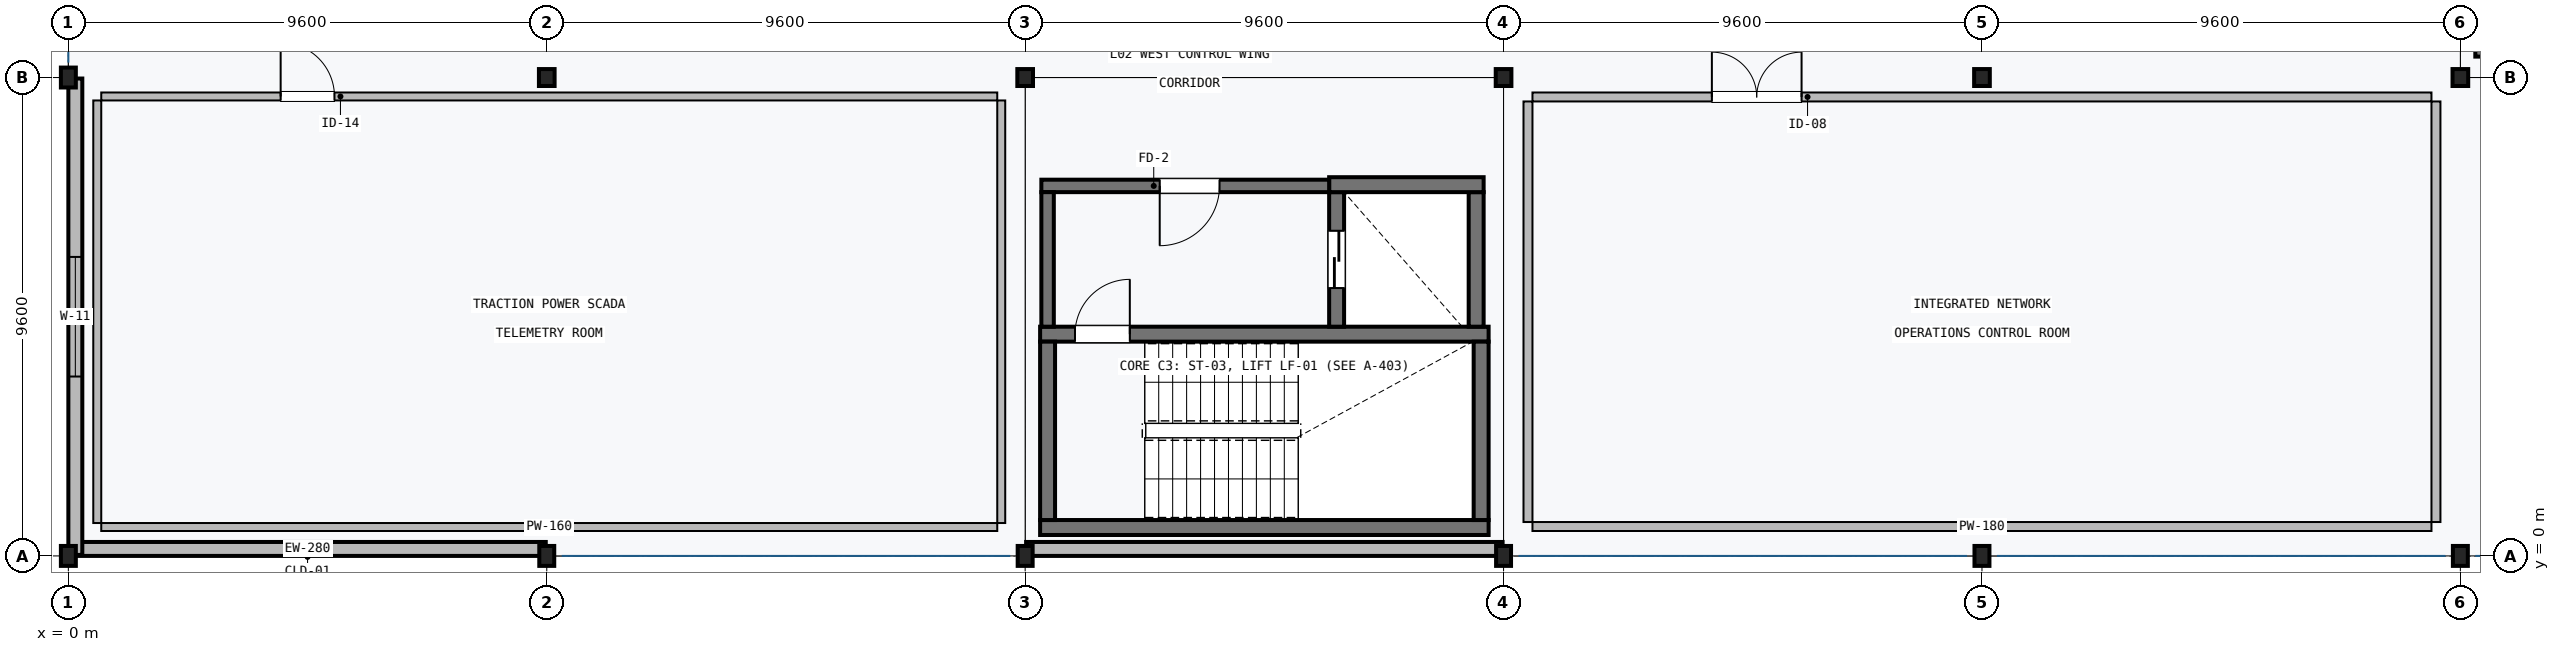
"""IFC4 building model, lengths in metres.
Left out: names, types, materials, properties, quantities, classifications, styles, units other than length and angle.
Written with IfcOpenShell. Run it as: python <this file> out.ifc"""

import sys

from ifc_helpers import new_model, si_unit, direction, frame, frame_2d, origin, origin_2d, place, context, subcontext, project, spatial, rectangle, i_section, extrude, element, fill, save


model = new_model("IFC4")
c1 = context("Model", 3, precision=1e-05, world=origin(), true_north=direction((0.0, 1.0)))
c2 = subcontext(c1, "Body", "Model", "MODEL_VIEW")
j1 = project(units=[si_unit("LENGTHUNIT", "METRE"), si_unit("PLANEANGLEUNIT", "RADIAN")], contexts=[c1])
p1 = place(None, origin())
s1 = spatial("IfcSite", under=j1, at=p1, CompositionType="ELEMENT")
p2 = place(p1, origin())
s2 = spatial("IfcBuilding", under=s1, at=p2, CompositionType="ELEMENT")
p3 = place(p2, frame((0.0, 0.0, 10.5)))
s3 = spatial("IfcBuildingStorey", under=s2, at=p3, CompositionType="ELEMENT", Elevation=10.5)
for number, where, z_axis, x_axis in (
    (1, (0.0, 0.0, 0.0), (0.0, 0.0, 1.0), (1.0, 0.0, 0.0)),
    (2, (0.0, 9.6, 0.0), (0.0, 0.0, 1.0), (1.0, 0.0, 0.0)),
    (3, (9.6, 0.0, 0.0), (0.0, 0.0, 1.0), (1.0, 0.0, 0.0)),
):
    element("IfcColumn", number, at=place(p3, frame(where, z_axis=z_axis, x_axis=x_axis)), inside=s3, PredefinedType="COLUMN", context=c2, shape_type="SweptSolid", body=[
        extrude(i_section(OverallWidth=0.3, OverallDepth=0.4, WebThickness=0.013, FlangeThickness=0.024, FilletRadius=0.027, at=origin_2d()), origin(), (0.0, 0.0, 1.0), 3.95),
    ])
p4 = place(p3, frame((9.6, 9.6, 0.0), z_axis=(0.0, 0.0, 1.0), x_axis=(1.0, 0.0, 0.0)))
e4 = element("IfcColumn", 4, at=p4, inside=s3, PredefinedType="COLUMN", context=c2, shape_type="SweptSolid", body=[
    extrude(i_section(OverallWidth=0.314, OverallDepth=0.34, WebThickness=0.019, FlangeThickness=0.031, FilletRadius=0.015, at=origin_2d()), origin(), (0.0, 0.0, 1.0), 3.95),
])
p5 = place(p3, frame((19.2, 0.0, 0.0), z_axis=(0.0, 0.0, 1.0), x_axis=(1.0, 0.0, 0.0)))
e5 = element("IfcColumn", 5, at=p5, inside=s3, PredefinedType="COLUMN", context=c2, shape_type="SweptSolid", body=[
    extrude(i_section(OverallWidth=0.3, OverallDepth=0.4, WebThickness=0.013, FlangeThickness=0.024, FilletRadius=0.027, at=origin_2d()), origin(), (0.0, 0.0, 1.0), 3.95),
])
p6 = place(p3, frame((19.2, 9.6, 0.0), z_axis=(0.0, 0.0, 1.0), x_axis=(1.0, 0.0, 0.0)))
e6 = element("IfcColumn", 6, at=p6, inside=s3, PredefinedType="COLUMN", context=c2, shape_type="SweptSolid", body=[
    extrude(i_section(OverallWidth=0.314, OverallDepth=0.34, WebThickness=0.019, FlangeThickness=0.031, FilletRadius=0.015, at=origin_2d()), origin(), (0.0, 0.0, 1.0), 3.95),
])
p7 = place(p3, frame((28.8, 0.0, 0.0), z_axis=(0.0, 0.0, 1.0), x_axis=(1.0, 0.0, 0.0)))
e7 = element("IfcColumn", 7, at=p7, inside=s3, PredefinedType="COLUMN", context=c2, shape_type="SweptSolid", body=[
    extrude(i_section(OverallWidth=0.3, OverallDepth=0.4, WebThickness=0.013, FlangeThickness=0.024, FilletRadius=0.027, at=origin_2d()), origin(), (0.0, 0.0, 1.0), 3.95),
])
p8 = place(p3, frame((28.8, 9.6, 0.0), z_axis=(0.0, 0.0, 1.0), x_axis=(1.0, 0.0, 0.0)))
e8 = element("IfcColumn", 8, at=p8, inside=s3, PredefinedType="COLUMN", context=c2, shape_type="SweptSolid", body=[
    extrude(i_section(OverallWidth=0.314, OverallDepth=0.34, WebThickness=0.019, FlangeThickness=0.031, FilletRadius=0.015, at=origin_2d()), origin(), (0.0, 0.0, 1.0), 3.95),
])
p9 = place(p3, frame((38.4, 0.0, 0.0), z_axis=(0.0, 0.0, 1.0), x_axis=(1.0, 0.0, 0.0)))
e9 = element("IfcColumn", 9, at=p9, inside=s3, PredefinedType="COLUMN", context=c2, shape_type="SweptSolid", body=[
    extrude(i_section(OverallWidth=0.3, OverallDepth=0.4, WebThickness=0.013, FlangeThickness=0.024, FilletRadius=0.027, at=origin_2d()), origin(), (0.0, 0.0, 1.0), 3.95),
])
p10 = place(p3, frame((38.4, 9.6, 0.0), z_axis=(0.0, 0.0, 1.0), x_axis=(1.0, 0.0, 0.0)))
e10 = element("IfcColumn", 10, at=p10, inside=s3, PredefinedType="COLUMN", context=c2, shape_type="SweptSolid", body=[
    extrude(i_section(OverallWidth=0.314, OverallDepth=0.34, WebThickness=0.019, FlangeThickness=0.031, FilletRadius=0.015, at=origin_2d()), origin(), (0.0, 0.0, 1.0), 3.95),
])
p11 = place(p3, frame((48.0, 0.0, 0.0), z_axis=(0.0, 0.0, 1.0), x_axis=(1.0, 0.0, 0.0)))
e11 = element("IfcColumn", 11, at=p11, inside=s3, PredefinedType="COLUMN", context=c2, shape_type="SweptSolid", body=[
    extrude(i_section(OverallWidth=0.3, OverallDepth=0.4, WebThickness=0.013, FlangeThickness=0.024, FilletRadius=0.027, at=origin_2d()), origin(), (0.0, 0.0, 1.0), 3.95),
])
p12 = place(p3, frame((48.0, 9.6, 0.0), z_axis=(0.0, 0.0, 1.0), x_axis=(1.0, 0.0, 0.0)))
e12 = element("IfcColumn", 12, at=p12, inside=s3, PredefinedType="COLUMN", context=c2, shape_type="SweptSolid", body=[
    extrude(i_section(OverallWidth=0.314, OverallDepth=0.34, WebThickness=0.019, FlangeThickness=0.031, FilletRadius=0.015, at=origin_2d()), origin(), (0.0, 0.0, 1.0), 3.95),
])
for number, where, z_axis, x_axis in (
    (13, (48.3, 10.17, 0.0), (0.0, 0.0, 1.0), (1.0, 0.0, 0.0)),
    (14, (19.5, 0.57, 0.0), (0.0, 0.0, 1.0), (1.0, 0.0, 0.0)),
):
    element("IfcWall", number, at=place(p3, frame(where, z_axis=z_axis, x_axis=x_axis)), inside=s3, PredefinedType="SHEAR", context=c2, shape_type="SweptSolid", body=[
        extrude(rectangle(XDim=9.0, YDim=0.3, at=frame_2d((4.5, 0.0))), origin(), (0.0, 0.0, 1.0), 3.95),
    ])
p13 = place(p3, frame((28.5, 4.45, 0.0), z_axis=(0.0, 0.0, 1.0), x_axis=(-1.0, 0.0, 0.0)))
e15 = element("IfcWall", 15, at=p13, inside=s3, PredefinedType="SHEAR", context=c2, shape_type="SweptSolid", body=[
    extrude(rectangle(XDim=9.0, YDim=0.3, at=frame_2d((4.5, 0.0))), origin(), (0.0, 0.0, 1.0), 3.95),
])
p14 = place(p13, frame((7.2, 0.0, 0.0)))
e16 = element("IfcOpeningElement", 16, at=p14, cuts=e15, PredefinedType="OPENING", context=c2, shape_type="SweptSolid", body=[
    extrude(rectangle(XDim=1.1, YDim=2.15, at=frame_2d((0.55, 1.075))), frame((0.0, 0.16, 0.0), z_axis=(0.0, -1.0, 0.0), x_axis=(1.0, 0.0, 0.0)), (0.0, 0.0, 1.0), 0.32),
])
for number, where, z_axis, x_axis in (
    (17, (19.65, 0.72, 0.0), (0.0, 0.0, 1.0), (0.0, 1.0, 0.0)),
    (18, (28.35, 4.3, 0.0), (0.0, 0.0, 1.0), (0.0, -1.0, 0.0)),
):
    element("IfcWall", number, at=place(p3, frame(where, z_axis=z_axis, x_axis=x_axis)), inside=s3, PredefinedType="SHEAR", context=c2, shape_type="SweptSolid", body=[
        extrude(rectangle(XDim=3.58, YDim=0.3, at=frame_2d((1.79, 0.0))), origin(), (0.0, 0.0, 1.0), 3.95),
    ])
p15 = place(p3, frame((25.45, 7.3, 0.0), z_axis=(0.0, 0.0, 1.0), x_axis=(0.0, -1.0, 0.0)))
e19 = element("IfcWall", 19, at=p15, inside=s3, PredefinedType="SHEAR", context=c2, shape_type="SweptSolid", body=[
    extrude(rectangle(XDim=2.7, YDim=0.3, at=frame_2d((1.35, 0.0))), origin(), (0.0, 0.0, 1.0), 3.95),
])
p16 = place(p15, frame((0.775, 0.0, 0.0)))
e20 = element("IfcOpeningElement", 20, at=p16, cuts=e19, PredefinedType="OPENING", context=c2, shape_type="SweptSolid", body=[
    extrude(rectangle(XDim=1.15, YDim=2.1, at=frame_2d((0.575, 1.05))), frame((0.0, 0.16, 0.0), z_axis=(0.0, -1.0, 0.0), x_axis=(1.0, 0.0, 0.0)), (0.0, 0.0, 1.0), 0.32),
])
p17 = place(p3, frame((28.25, 4.6, 0.0), z_axis=(0.0, 0.0, 1.0), x_axis=(0.0, 1.0, 0.0)))
e21 = element("IfcWall", 21, at=p17, inside=s3, PredefinedType="SHEAR", context=c2, shape_type="SweptSolid", body=[
    extrude(rectangle(XDim=2.7, YDim=0.3, at=frame_2d((1.35, 0.0))), origin(), (0.0, 0.0, 1.0), 3.95),
])
p18 = place(p3, frame((25.3, 7.45, 0.0), z_axis=(0.0, 0.0, 1.0), x_axis=(1.0, 0.0, 0.0)))
e22 = element("IfcWall", 22, at=p18, inside=s3, PredefinedType="SHEAR", context=c2, shape_type="SweptSolid", body=[
    extrude(rectangle(XDim=3.1, YDim=0.3, at=frame_2d((1.55, 0.0))), origin(), (0.0, 0.0, 1.0), 3.95),
])
p19 = place(p3, frame((25.3, 7.425, 0.0), z_axis=(0.0, 0.0, 1.0), x_axis=(-1.0, 0.0, 0.0)))
e23 = element("IfcWall", 23, at=p19, inside=s3, PredefinedType="SHEAR", context=c2, shape_type="SweptSolid", body=[
    extrude(rectangle(XDim=5.775, YDim=0.25, at=frame_2d((2.888, 0.0))), origin(), (0.0, 0.0, 1.0), 3.95),
])
p20 = place(p19, frame((2.2, 0.0, 0.0)))
e24 = element("IfcOpeningElement", 24, at=p20, cuts=e23, PredefinedType="OPENING", context=c2, shape_type="SweptSolid", body=[
    extrude(rectangle(XDim=1.2, YDim=2.15, at=frame_2d((0.6, 1.075))), frame((0.0, 0.135, 0.0), z_axis=(0.0, -1.0, 0.0), x_axis=(1.0, 0.0, 0.0)), (0.0, 0.0, 1.0), 0.27),
])
p21 = place(p3, frame((19.65, 4.6, 0.0), z_axis=(0.0, 0.0, 1.0), x_axis=(0.0, 1.0, 0.0)))
e25 = element("IfcWall", 25, at=p21, inside=s3, PredefinedType="SHEAR", context=c2, shape_type="SweptSolid", body=[
    extrude(rectangle(XDim=2.7, YDim=0.25, at=frame_2d((1.35, 0.0))), origin(), (0.0, 0.0, 1.0), 3.95),
])
p22 = place(p3, frame((9.58, 0.14, 0.0), z_axis=(0.0, 0.0, 1.0), x_axis=(-1.0, 0.0, 0.0)))
e26 = element("IfcWall", 26, at=p22, inside=s3, PredefinedType="SOLIDWALL", context=c2, shape_type="SweptSolid", body=[
    extrude(rectangle(XDim=9.56, YDim=0.28, at=frame_2d((4.78, 0.0))), origin(), (0.0, 0.0, 1.0), 3.66),
])
p23 = place(p3, frame((0.14, 0.02, 0.0), z_axis=(0.0, 0.0, 1.0), x_axis=(0.0, 1.0, 0.0)))
e27 = element("IfcWall", 27, at=p23, inside=s3, PredefinedType="SOLIDWALL", context=c2, shape_type="SweptSolid", body=[
    extrude(rectangle(XDim=9.56, YDim=0.28, at=frame_2d((4.78, 0.0))), origin(), (0.0, 0.0, 1.0), 3.493),
])
p24 = place(p23, frame((3.58, 0.0, 1.3)))
e28 = element("IfcOpeningElement", 28, at=p24, cuts=e27, PredefinedType="OPENING", context=c2, shape_type="SweptSolid", body=[
    extrude(rectangle(XDim=2.4, YDim=1.05, at=frame_2d((1.2, 0.525))), frame((0.0, 0.15, 0.0), z_axis=(0.0, -1.0, 0.0), x_axis=(1.0, 0.0, 0.0)), (0.0, 0.0, 1.0), 0.3),
])
p25 = place(p3, frame((28.78, 0.14, 0.0), z_axis=(0.0, 0.0, 1.0), x_axis=(-1.0, 0.0, 0.0)))
e29 = element("IfcWall", 29, at=p25, inside=s3, PredefinedType="SOLIDWALL", context=c2, shape_type="SweptSolid", body=[
    extrude(rectangle(XDim=9.56, YDim=0.28, at=frame_2d((4.78, 0.0))), origin(), (0.0, 0.0, 1.0), 3.66),
])
p26 = place(p3, frame((47.42, 0.59, 0.0), z_axis=(0.0, 0.0, 1.0), x_axis=(-1.0, 0.0, 0.0)))
e30 = element("IfcWall", 30, at=p26, inside=s3, PredefinedType="PARTITIONING", context=c2, shape_type="SweptSolid", body=[
    extrude(rectangle(XDim=18.04, YDim=0.18, at=frame_2d((9.02, 0.0))), origin(), (0.0, 0.0, 1.0), 3.483),
])
p27 = place(p3, frame((29.38, 9.21, 0.0), z_axis=(0.0, 0.0, 1.0), x_axis=(1.0, 0.0, 0.0)))
e31 = element("IfcWall", 31, at=p27, inside=s3, PredefinedType="PARTITIONING", context=c2, shape_type="SweptSolid", body=[
    extrude(rectangle(XDim=18.04, YDim=0.18, at=frame_2d((9.02, 0.0))), origin(), (0.0, 0.0, 1.0), 3.483),
])
p28 = place(p27, frame((3.6, 0.0, 0.0)))
e32 = element("IfcOpeningElement", 32, at=p28, cuts=e31, PredefinedType="OPENING", context=c2, shape_type="SweptSolid", body=[
    extrude(rectangle(XDim=1.8, YDim=2.35, at=frame_2d((0.9, 1.175))), frame((0.0, 0.1, 0.0), z_axis=(0.0, -1.0, 0.0), x_axis=(1.0, 0.0, 0.0)), (0.0, 0.0, 1.0), 0.2),
])
for number, where, z_axis, x_axis in (
    (33, (29.29, 0.68, 0.0), (0.0, 0.0, 1.0), (0.0, 1.0, 0.0)),
    (34, (47.51, 9.12, 0.0), (0.0, 0.0, 1.0), (0.0, -1.0, 0.0)),
):
    element("IfcWall", number, at=place(p3, frame(where, z_axis=z_axis, x_axis=x_axis)), inside=s3, PredefinedType="PARTITIONING", context=c2, shape_type="SweptSolid", body=[
        extrude(rectangle(XDim=8.44, YDim=0.18, at=frame_2d((4.22, 0.0))), origin(), (0.0, 0.0, 1.0), 3.59),
    ])
p29 = place(p3, frame((18.64, 0.58, 0.0), z_axis=(0.0, 0.0, 1.0), x_axis=(-1.0, 0.0, 0.0)))
e35 = element("IfcWall", 35, at=p29, inside=s3, PredefinedType="PARTITIONING", context=c2, shape_type="SweptSolid", body=[
    extrude(rectangle(XDim=17.98, YDim=0.16, at=frame_2d((8.99, 0.0))), origin(), (0.0, 0.0, 1.0), 3.483),
])
p30 = place(p3, frame((0.66, 9.22, 0.0), z_axis=(0.0, 0.0, 1.0), x_axis=(1.0, 0.0, 0.0)))
e36 = element("IfcWall", 36, at=p30, inside=s3, PredefinedType="PARTITIONING", context=c2, shape_type="SweptSolid", body=[
    extrude(rectangle(XDim=17.98, YDim=0.16, at=frame_2d((8.99, 0.0))), origin(), (0.0, 0.0, 1.0), 3.483),
])
p31 = place(p30, frame((3.6, 0.0, 0.0)))
e37 = element("IfcOpeningElement", 37, at=p31, cuts=e36, PredefinedType="OPENING", context=c2, shape_type="SweptSolid", body=[
    extrude(rectangle(XDim=1.08, YDim=2.2, at=frame_2d((0.54, 1.1))), frame((0.0, 0.09, 0.0), z_axis=(0.0, -1.0, 0.0), x_axis=(1.0, 0.0, 0.0)), (0.0, 0.0, 1.0), 0.18),
])
for number, where, z_axis, x_axis in (
    (38, (0.58, 0.66, 0.0), (0.0, 0.0, 1.0), (0.0, 1.0, 0.0)),
    (39, (18.72, 9.14, 0.0), (0.0, 0.0, 1.0), (0.0, -1.0, 0.0)),
):
    element("IfcWall", number, at=place(p3, frame(where, z_axis=z_axis, x_axis=x_axis)), inside=s3, PredefinedType="PARTITIONING", context=c2, shape_type="SweptSolid", body=[
        extrude(rectangle(XDim=8.48, YDim=0.16, at=frame_2d((4.24, 0.0))), origin(), (0.0, 0.0, 1.0), 3.59),
    ])
p32 = place(p14, frame((1.1, 0.0, 0.0), z_axis=(0.0, 0.0, 1.0), x_axis=(-1.0, 0.0, 0.0)))
e40 = element("IfcDoor", 40, at=p32, inside=s3, OperationType="SINGLE_SWING_LEFT", PredefinedType="DOOR", context=c2, shape_type="SweptSolid", body=[
    extrude(rectangle(XDim=1.1, YDim=2.15, at=frame_2d((0.55, 1.075))), frame((0.0, 0.025, 0.0), z_axis=(0.0, -1.0, 0.0), x_axis=(1.0, 0.0, 0.0)), (0.0, 0.0, 1.0), 0.05),
])
fill(e16, e40)
p33 = place(p16, frame((1.15, 0.0, 0.0), z_axis=(0.0, 0.0, 1.0), x_axis=(-1.0, 0.0, 0.0)))
e41 = element("IfcDoor", 41, at=p33, inside=s3, OperationType="DOUBLE_DOOR_SLIDING", PredefinedType="DOOR", context=c2, shape_type="SweptSolid", body=[
    extrude(rectangle(XDim=1.15, YDim=2.1, at=frame_2d((0.575, 1.05))), frame((0.0, 0.025, 0.0), z_axis=(0.0, -1.0, 0.0), x_axis=(1.0, 0.0, 0.0)), (0.0, 0.0, 1.0), 0.05),
])
fill(e20, e41)
p34 = place(p20, origin())
e42 = element("IfcDoor", 42, at=p34, inside=s3, OperationType="SINGLE_SWING_RIGHT", PredefinedType="DOOR", context=c2, shape_type="SweptSolid", body=[
    extrude(rectangle(XDim=1.2, YDim=2.15, at=frame_2d((0.6, 1.075))), frame((0.0, 0.025, 0.0), z_axis=(0.0, -1.0, 0.0), x_axis=(1.0, 0.0, 0.0)), (0.0, 0.0, 1.0), 0.05),
])
fill(e24, e42)
p35 = place(p24, origin())
e43 = element("IfcWindow", 43, at=p35, inside=s3, PartitioningType="SINGLE_PANEL", PredefinedType="WINDOW", context=c2, shape_type="SweptSolid", body=[
    extrude(rectangle(XDim=2.4, YDim=1.05, at=frame_2d((1.2, 0.525))), frame((0.0, 0.03, 0.0), z_axis=(0.0, -1.0, 0.0), x_axis=(1.0, 0.0, 0.0)), (0.0, 0.0, 1.0), 0.06),
])
fill(e28, e43)
p36 = place(p28, origin())
e44 = element("IfcDoor", 44, at=p36, inside=s3, OperationType="DOUBLE_DOOR_SINGLE_SWING", PredefinedType="DOOR", context=c2, shape_type="SweptSolid", body=[
    extrude(rectangle(XDim=1.8, YDim=2.35, at=frame_2d((0.9, 1.175))), frame((0.0, 0.025, 0.0), z_axis=(0.0, -1.0, 0.0), x_axis=(1.0, 0.0, 0.0)), (0.0, 0.0, 1.0), 0.05),
])
fill(e32, e44)
p37 = place(p31, origin())
e45 = element("IfcDoor", 45, at=p37, inside=s3, OperationType="SINGLE_SWING_LEFT", PredefinedType="DOOR", context=c2, shape_type="SweptSolid", body=[
    extrude(rectangle(XDim=1.08, YDim=2.2, at=frame_2d((0.54, 1.1))), frame((0.0, 0.025, 0.0), z_axis=(0.0, -1.0, 0.0), x_axis=(1.0, 0.0, 0.0)), (0.0, 0.0, 1.0), 0.05),
])
fill(e37, e45)
save(model, sys.argv[1])
